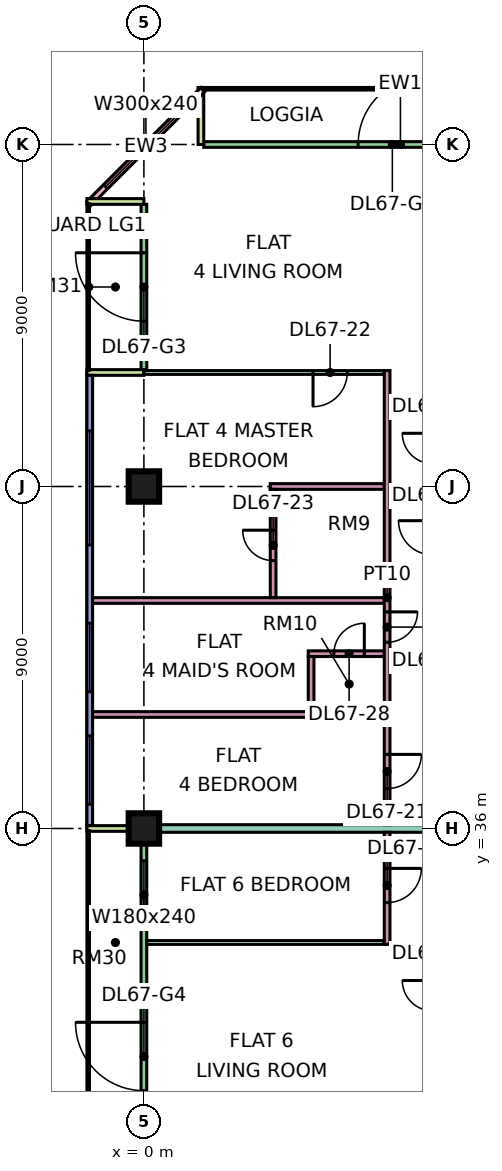
"""IFC4 building model, lengths in metres.
Left out: names, types, materials, properties, quantities, classifications, styles, units other than length and angle.
Written with IfcOpenShell. Run it as: python <this file> out.ifc"""

import sys

from ifc_helpers import new_model, si_unit, direction, frame, frame_2d, origin, origin_2d, place, context, subcontext, project, spatial, rectangle, extrude, element, fill, save


model = new_model("IFC4")
c1 = context("Model", 3, precision=1e-05, world=origin(), true_north=direction((0.0, 1.0)))
c2 = subcontext(c1, "Body", "Model", "MODEL_VIEW")
j1 = project(units=[si_unit("LENGTHUNIT", "METRE"), si_unit("PLANEANGLEUNIT", "RADIAN")], contexts=[c1])
p1 = place(None, origin())
s1 = spatial("IfcSite", under=j1, at=p1, CompositionType="ELEMENT")
p2 = place(p1, origin())
s2 = spatial("IfcBuilding", under=s1, at=p2, CompositionType="ELEMENT")
p3 = place(p2, frame((0.0, 0.0, 288.4)))
s3 = spatial("IfcBuildingStorey", under=s2, at=p3, CompositionType="ELEMENT", Elevation=288.4)
p4 = place(p3, frame((0.0, 36.0, 0.0), z_axis=(0.0, 0.0, 1.0), x_axis=(1.0, 0.0, 0.0)))
e1 = element("IfcColumn", 1, at=p4, inside=s3, PredefinedType="COLUMN", context=c2, shape_type="SweptSolid", body=[
    extrude(rectangle(XDim=0.8, YDim=0.8, at=origin_2d()), origin(), (0.0, 0.0, 1.0), 3.75),
])
p5 = place(p3, frame((0.0, 45.0, 0.0), z_axis=(0.0, 0.0, 1.0), x_axis=(1.0, 0.0, 0.0)))
e2 = element("IfcColumn", 2, at=p5, inside=s3, PredefinedType="COLUMN", context=c2, shape_type="SweptSolid", body=[
    extrude(rectangle(XDim=0.8, YDim=0.8, at=origin_2d()), origin(), (0.0, 0.0, 1.0), 3.75),
])
p6 = place(p3, frame((11.925, 54.0, 0.0), z_axis=(0.0, 0.0, 1.0), x_axis=(-1.0, 0.0, 0.0)))
e3 = element("IfcWall", 3, at=p6, inside=s3, PredefinedType="SOLIDWALL", context=c2, shape_type="SweptSolid", body=[
    extrude(rectangle(XDim=10.35, YDim=0.15, at=frame_2d((5.175, 0.0))), origin(), (0.0, 0.0, 1.0), 3.35),
])
p7 = place(p6, frame((4.488, 0.0, 0.0)))
e4 = element("IfcOpeningElement", 4, at=p7, cuts=e3, PredefinedType="OPENING", context=c2, shape_type="SweptSolid", body=[
    extrude(rectangle(XDim=1.8, YDim=2.4, at=frame_2d((0.9, 1.2))), frame((0.0, 0.085, 0.0), z_axis=(0.0, -1.0, 0.0), x_axis=(1.0, 0.0, 0.0)), (0.0, 0.0, 1.0), 0.17),
])
p8 = place(p3, frame((1.5, 55.5, 0.0), z_axis=(0.0, 0.0, 1.0), x_axis=(0.0, -1.0, 0.0)))
e5 = element("IfcWall", 5, at=p8, inside=s3, PredefinedType="SOLIDWALL", context=c2, shape_type="SweptSolid", body=[
    extrude(rectangle(XDim=1.5, YDim=0.15, at=frame_2d((0.75, 0.0))), origin(), (0.0, 0.0, 1.0), 3.35),
])
p9 = place(p3, frame((1.553, 55.447, 0.0), z_axis=(0.0, 0.0, 1.0), x_axis=(-0.707106781187, -0.707106781187, 0.0)))
e6 = element("IfcWall", 6, at=p9, inside=s3, PredefinedType="SOLIDWALL", context=c2, shape_type="SweptSolid", body=[
    extrude(rectangle(XDim=4.243, YDim=0.15, at=frame_2d((2.121, 0.0))), origin(), (0.0, 0.0, 1.0), 3.35),
])
p10 = place(p9, frame((0.621, 0.0, 0.45)))
e7 = element("IfcOpeningElement", 7, at=p10, cuts=e6, PredefinedType="OPENING", context=c2, shape_type="SweptSolid", body=[
    extrude(rectangle(XDim=3.0, YDim=2.4, at=frame_2d((1.5, 1.2))), frame((0.0, 0.085, 0.0), z_axis=(0.0, -1.0, 0.0), x_axis=(1.0, 0.0, 0.0)), (0.0, 0.0, 1.0), 0.17),
])
p11 = place(p3, frame((0.0, 52.425, 0.0), z_axis=(0.0, 0.0, 1.0), x_axis=(0.0, -1.0, 0.0)))
e8 = element("IfcWall", 8, at=p11, inside=s3, PredefinedType="SOLIDWALL", context=c2, shape_type="SweptSolid", body=[
    extrude(rectangle(XDim=4.35, YDim=0.15, at=frame_2d((2.175, 0.0))), origin(), (0.0, 0.0, 1.0), 3.35),
])
p12 = place(p11, frame((1.275, 0.0, 0.0)))
e9 = element("IfcOpeningElement", 9, at=p12, cuts=e8, PredefinedType="OPENING", context=c2, shape_type="SweptSolid", body=[
    extrude(rectangle(XDim=1.8, YDim=2.4, at=frame_2d((0.9, 1.2))), frame((0.0, 0.085, 0.0), z_axis=(0.0, -1.0, 0.0), x_axis=(1.0, 0.0, 0.0)), (0.0, 0.0, 1.0), 0.17),
])
for number, where, z_axis, x_axis in (
    (10, (-1.5, 52.5, 0.0), (0.0, 0.0, 1.0), (1.0, 0.0, 0.0)),
    (11, (-1.5, 48.0, 0.0), (0.0, 0.0, 1.0), (1.0, 0.0, 0.0)),
):
    element("IfcWall", number, at=place(p3, frame(where, z_axis=z_axis, x_axis=x_axis)), inside=s3, PredefinedType="SOLIDWALL", context=c2, shape_type="SweptSolid", body=[
        extrude(rectangle(XDim=1.5, YDim=0.15, at=frame_2d((0.75, 0.0))), origin(), (0.0, 0.0, 1.0), 3.35),
    ])
p13 = place(p3, frame((-1.425, 47.925, 0.0), z_axis=(0.0, 0.0, 1.0), x_axis=(0.0, -1.0, 0.0)))
e12 = element("IfcWall", 12, at=p13, inside=s3, PredefinedType="SOLIDWALL", context=c2, shape_type="SweptSolid", body=[
    extrude(rectangle(XDim=11.85, YDim=0.15, at=frame_2d((5.925, 0.0))), origin(), (0.0, 0.0, 1.0), 3.35),
])
p14 = place(p13, frame((1.462, 0.0, 0.45)))
e13 = element("IfcOpeningElement", 13, at=p14, cuts=e12, PredefinedType="OPENING", context=c2, shape_type="SweptSolid", body=[
    extrude(rectangle(XDim=3.0, YDim=2.4, at=frame_2d((1.5, 1.2))), frame((0.0, 0.085, 0.0), z_axis=(0.0, -1.0, 0.0), x_axis=(1.0, 0.0, 0.0)), (0.0, 0.0, 1.0), 0.17),
])
p15 = place(p13, frame((6.525, 0.0, 0.45)))
e14 = element("IfcOpeningElement", 14, at=p15, cuts=e12, PredefinedType="OPENING", context=c2, shape_type="SweptSolid", body=[
    extrude(rectangle(XDim=1.8, YDim=2.4, at=frame_2d((0.9, 1.2))), frame((0.0, 0.085, 0.0), z_axis=(0.0, -1.0, 0.0), x_axis=(1.0, 0.0, 0.0)), (0.0, 0.0, 1.0), 0.17),
])
p16 = place(p13, frame((9.488, 0.0, 0.45)))
e15 = element("IfcOpeningElement", 15, at=p16, cuts=e12, PredefinedType="OPENING", context=c2, shape_type="SweptSolid", body=[
    extrude(rectangle(XDim=1.8, YDim=2.4, at=frame_2d((0.9, 1.2))), frame((0.0, 0.085, 0.0), z_axis=(0.0, -1.0, 0.0), x_axis=(1.0, 0.0, 0.0)), (0.0, 0.0, 1.0), 0.17),
])
p17 = place(p3, frame((0.0, 35.925, 0.0), z_axis=(0.0, 0.0, 1.0), x_axis=(0.0, -1.0, 0.0)))
e16 = element("IfcWall", 16, at=p17, inside=s3, PredefinedType="SOLIDWALL", context=c2, shape_type="SweptSolid", body=[
    extrude(rectangle(XDim=11.85, YDim=0.15, at=frame_2d((5.925, 0.0))), origin(), (0.0, 0.0, 1.0), 3.35),
])
p18 = place(p17, frame((0.775, 0.0, 0.45)))
e17 = element("IfcOpeningElement", 17, at=p18, cuts=e16, PredefinedType="OPENING", context=c2, shape_type="SweptSolid", body=[
    extrude(rectangle(XDim=1.8, YDim=2.4, at=frame_2d((0.9, 1.2))), frame((0.0, 0.085, 0.0), z_axis=(0.0, -1.0, 0.0), x_axis=(1.0, 0.0, 0.0)), (0.0, 0.0, 1.0), 0.17),
])
p19 = place(p17, frame((5.025, 0.0, 0.0)))
e18 = element("IfcOpeningElement", 18, at=p19, cuts=e16, PredefinedType="OPENING", context=c2, shape_type="SweptSolid", body=[
    extrude(rectangle(XDim=1.8, YDim=2.4, at=frame_2d((0.9, 1.2))), frame((0.0, 0.085, 0.0), z_axis=(0.0, -1.0, 0.0), x_axis=(1.0, 0.0, 0.0)), (0.0, 0.0, 1.0), 0.17),
])
p20 = place(p17, frame((9.275, 0.0, 0.45)))
e19 = element("IfcOpeningElement", 19, at=p20, cuts=e16, PredefinedType="OPENING", context=c2, shape_type="SweptSolid", body=[
    extrude(rectangle(XDim=1.8, YDim=2.4, at=frame_2d((0.9, 1.2))), frame((0.0, 0.085, 0.0), z_axis=(0.0, -1.0, 0.0), x_axis=(1.0, 0.0, 0.0)), (0.0, 0.0, 1.0), 0.17),
])
p21 = place(p3, frame((-1.5, 36.0, 0.0), z_axis=(0.0, 0.0, 1.0), x_axis=(1.0, 0.0, 0.0)))
e20 = element("IfcWall", 20, at=p21, inside=s3, PredefinedType="SOLIDWALL", context=c2, shape_type="SweptSolid", body=[
    extrude(rectangle(XDim=1.5, YDim=0.15, at=frame_2d((0.75, 0.0))), origin(), (0.0, 0.0, 1.0), 3.35),
])
for number, where, z_axis, x_axis in (
    (21, (-1.351, 39.0, 0.0), (0.0, 0.0, 1.0), (1.0, 0.0, 0.0)),
    (22, (-1.351, 42.0, 0.0), (0.0, 0.0, 1.0), (1.0, 0.0, 0.0)),
):
    element("IfcWall", number, at=place(p3, frame(where, z_axis=z_axis, x_axis=x_axis)), inside=s3, PredefinedType="PARTITIONING", context=c2, shape_type="SweptSolid", body=[
        extrude(rectangle(XDim=7.676, YDim=0.15, at=frame_2d((3.838, 0.0))), origin(), (0.0, 0.0, 1.0), 3.35),
    ])
e23 = element("IfcWall", 23, at=p4, inside=s3, PredefinedType="PARTITIONING", context=c2, shape_type="SweptSolid", body=[
    extrude(rectangle(XDim=12.3, YDim=0.2, at=frame_2d((6.15, 0.0))), origin(), (0.0, 0.0, 1.0), 3.35),
])
p22 = place(p3, frame((0.0, 48.0, 0.0), z_axis=(0.0, 0.0, 1.0), x_axis=(1.0, 0.0, 0.0)))
e24 = element("IfcWall", 24, at=p22, inside=s3, PredefinedType="PARTITIONING", context=c2, shape_type="SweptSolid", body=[
    extrude(rectangle(XDim=6.325, YDim=0.1, at=frame_2d((3.163, 0.0))), origin(), (0.0, 0.0, 1.0), 3.35),
])
p23 = place(p22, frame((4.45, 0.0, 0.0)))
e25 = element("IfcOpeningElement", 25, at=p23, cuts=e24, PredefinedType="OPENING", context=c2, shape_type="SweptSolid", body=[
    extrude(rectangle(XDim=0.9, YDim=2.1, at=frame_2d((0.45, 1.05))), frame((0.0, 0.06, 0.0), z_axis=(0.0, -1.0, 0.0), x_axis=(1.0, 0.0, 0.0)), (0.0, 0.0, 1.0), 0.12),
])
p24 = place(p3, frame((0.074, 33.0, 0.0), z_axis=(0.0, 0.0, 1.0), x_axis=(1.0, 0.0, 0.0)))
e26 = element("IfcWall", 26, at=p24, inside=s3, PredefinedType="PARTITIONING", context=c2, shape_type="SweptSolid", body=[
    extrude(rectangle(XDim=6.251, YDim=0.1, at=frame_2d((3.125, 0.0))), origin(), (0.0, 0.0, 1.0), 3.35),
])
p25 = place(p3, frame((3.325, 45.0, 0.0), z_axis=(0.0, 0.0, 1.0), x_axis=(1.0, 0.0, 0.0)))
e27 = element("IfcWall", 27, at=p25, inside=s3, PredefinedType="PARTITIONING", context=c2, shape_type="SweptSolid", body=[
    extrude(rectangle(XDim=3.0, YDim=0.15, at=frame_2d((1.5, 0.0))), origin(), (0.0, 0.0, 1.0), 3.35),
])
p26 = place(p3, frame((3.4, 42.075, 0.0), z_axis=(0.0, 0.0, 1.0), x_axis=(0.0, 1.0, 0.0)))
e28 = element("IfcWall", 28, at=p26, inside=s3, PredefinedType="PARTITIONING", context=c2, shape_type="SweptSolid", body=[
    extrude(rectangle(XDim=2.85, YDim=0.15, at=frame_2d((1.425, 0.0))), origin(), (0.0, 0.0, 1.0), 3.35),
])
p27 = place(p26, frame((0.975, 0.0, 0.0)))
e29 = element("IfcOpeningElement", 29, at=p27, cuts=e28, PredefinedType="OPENING", context=c2, shape_type="SweptSolid", body=[
    extrude(rectangle(XDim=0.8, YDim=2.1, at=frame_2d((0.4, 1.05))), frame((0.0, 0.085, 0.0), z_axis=(0.0, -1.0, 0.0), x_axis=(1.0, 0.0, 0.0)), (0.0, 0.0, 1.0), 0.17),
])
p28 = place(p3, frame((4.325, 40.6, 0.0), z_axis=(0.0, 0.0, 1.0), x_axis=(1.0, 0.0, 0.0)))
e30 = element("IfcWall", 30, at=p28, inside=s3, PredefinedType="PARTITIONING", context=c2, shape_type="SweptSolid", body=[
    extrude(rectangle(XDim=2.0, YDim=0.15, at=frame_2d((1.0, 0.0))), origin(), (0.0, 0.0, 1.0), 3.35),
])
p29 = place(p28, frame((0.675, 0.0, 0.0)))
e31 = element("IfcOpeningElement", 31, at=p29, cuts=e30, PredefinedType="OPENING", context=c2, shape_type="SweptSolid", body=[
    extrude(rectangle(XDim=0.8, YDim=2.1, at=frame_2d((0.4, 1.05))), frame((0.0, 0.085, 0.0), z_axis=(0.0, -1.0, 0.0), x_axis=(1.0, 0.0, 0.0)), (0.0, 0.0, 1.0), 0.17),
])
p30 = place(p3, frame((4.4, 39.075, 0.0), z_axis=(0.0, 0.0, 1.0), x_axis=(0.0, 1.0, 0.0)))
e32 = element("IfcWall", 32, at=p30, inside=s3, PredefinedType="PARTITIONING", context=c2, shape_type="SweptSolid", body=[
    extrude(rectangle(XDim=1.45, YDim=0.15, at=frame_2d((0.725, 0.0))), origin(), (0.0, 0.0, 1.0), 3.35),
])
p31 = place(p3, frame((6.4, 32.95, 0.0), z_axis=(0.0, 0.0, 1.0), x_axis=(0.0, 1.0, 0.0)))
e33 = element("IfcWall", 33, at=p31, inside=s3, PredefinedType="PARTITIONING", context=c2, shape_type="SweptSolid", body=[
    extrude(rectangle(XDim=2.95, YDim=0.15, at=frame_2d((1.475, 0.0))), origin(), (0.0, 0.0, 1.0), 3.35),
])
p32 = place(p31, frame((1.1, 0.0, 0.0)))
e34 = element("IfcOpeningElement", 34, at=p32, cuts=e33, PredefinedType="OPENING", context=c2, shape_type="SweptSolid", body=[
    extrude(rectangle(XDim=0.9, YDim=2.1, at=frame_2d((0.45, 1.05))), frame((0.0, 0.085, 0.0), z_axis=(0.0, -1.0, 0.0), x_axis=(1.0, 0.0, 0.0)), (0.0, 0.0, 1.0), 0.17),
])
p33 = place(p3, frame((6.4, 36.1, 0.0), z_axis=(0.0, 0.0, 1.0), x_axis=(0.0, 1.0, 0.0)))
e35 = element("IfcWall", 35, at=p33, inside=s3, PredefinedType="PARTITIONING", context=c2, shape_type="SweptSolid", body=[
    extrude(rectangle(XDim=11.95, YDim=0.15, at=frame_2d((5.975, 0.0))), origin(), (0.0, 0.0, 1.0), 3.35),
])
p34 = place(p33, frame((0.95, 0.0, 0.0)))
e36 = element("IfcOpeningElement", 36, at=p34, cuts=e35, PredefinedType="OPENING", context=c2, shape_type="SweptSolid", body=[
    extrude(rectangle(XDim=0.9, YDim=2.1, at=frame_2d((0.45, 1.05))), frame((0.0, 0.085, 0.0), z_axis=(0.0, -1.0, 0.0), x_axis=(1.0, 0.0, 0.0)), (0.0, 0.0, 1.0), 0.17),
])
p35 = place(p33, frame((4.8, 0.0, 0.0)))
e37 = element("IfcOpeningElement", 37, at=p35, cuts=e35, PredefinedType="OPENING", context=c2, shape_type="SweptSolid", body=[
    extrude(rectangle(XDim=0.8, YDim=2.1, at=frame_2d((0.4, 1.05))), frame((0.0, 0.085, 0.0), z_axis=(0.0, -1.0, 0.0), x_axis=(1.0, 0.0, 0.0)), (0.0, 0.0, 1.0), 0.17),
])
p36 = place(p7, frame((1.8, 0.0, 0.0), z_axis=(0.0, 0.0, 1.0), x_axis=(-1.0, 0.0, 0.0)))
e38 = element("IfcDoor", 38, at=p36, inside=s3, OperationType="DOUBLE_DOOR_SINGLE_SWING", PredefinedType="DOOR", context=c2, shape_type="SweptSolid", body=[
    extrude(rectangle(XDim=1.8, YDim=2.4, at=frame_2d((0.9, 1.2))), frame((0.0, 0.025, 0.0), z_axis=(0.0, -1.0, 0.0), x_axis=(1.0, 0.0, 0.0)), (0.0, 0.0, 1.0), 0.05),
])
fill(e4, e38)
p37 = place(p10, origin())
e39 = element("IfcWindow", 39, at=p37, inside=s3, PartitioningType="SINGLE_PANEL", PredefinedType="WINDOW", context=c2, shape_type="SweptSolid", body=[
    extrude(rectangle(XDim=3.0, YDim=2.4, at=frame_2d((1.5, 1.2))), frame((0.0, 0.03, 0.0), z_axis=(0.0, -1.0, 0.0), x_axis=(1.0, 0.0, 0.0)), (0.0, 0.0, 1.0), 0.06),
])
fill(e7, e39)
p38 = place(p12, frame((1.8, 0.0, 0.0), z_axis=(0.0, 0.0, 1.0), x_axis=(-1.0, 0.0, 0.0)))
e40 = element("IfcDoor", 40, at=p38, inside=s3, OperationType="DOUBLE_DOOR_SINGLE_SWING", PredefinedType="DOOR", context=c2, shape_type="SweptSolid", body=[
    extrude(rectangle(XDim=1.8, YDim=2.4, at=frame_2d((0.9, 1.2))), frame((0.0, 0.025, 0.0), z_axis=(0.0, -1.0, 0.0), x_axis=(1.0, 0.0, 0.0)), (0.0, 0.0, 1.0), 0.05),
])
fill(e9, e40)
p39 = place(p14, origin())
e41 = element("IfcWindow", 41, at=p39, inside=s3, PartitioningType="SINGLE_PANEL", PredefinedType="WINDOW", context=c2, shape_type="SweptSolid", body=[
    extrude(rectangle(XDim=3.0, YDim=2.4, at=frame_2d((1.5, 1.2))), frame((0.0, 0.03, 0.0), z_axis=(0.0, -1.0, 0.0), x_axis=(1.0, 0.0, 0.0)), (0.0, 0.0, 1.0), 0.06),
])
fill(e13, e41)
p40 = place(p15, origin())
e42 = element("IfcWindow", 42, at=p40, inside=s3, PartitioningType="SINGLE_PANEL", PredefinedType="WINDOW", context=c2, shape_type="SweptSolid", body=[
    extrude(rectangle(XDim=1.8, YDim=2.4, at=frame_2d((0.9, 1.2))), frame((0.0, 0.03, 0.0), z_axis=(0.0, -1.0, 0.0), x_axis=(1.0, 0.0, 0.0)), (0.0, 0.0, 1.0), 0.06),
])
fill(e14, e42)
p41 = place(p16, origin())
e43 = element("IfcWindow", 43, at=p41, inside=s3, PartitioningType="SINGLE_PANEL", PredefinedType="WINDOW", context=c2, shape_type="SweptSolid", body=[
    extrude(rectangle(XDim=1.8, YDim=2.4, at=frame_2d((0.9, 1.2))), frame((0.0, 0.03, 0.0), z_axis=(0.0, -1.0, 0.0), x_axis=(1.0, 0.0, 0.0)), (0.0, 0.0, 1.0), 0.06),
])
fill(e15, e43)
p42 = place(p18, origin())
e44 = element("IfcWindow", 44, at=p42, inside=s3, PartitioningType="SINGLE_PANEL", PredefinedType="WINDOW", context=c2, shape_type="SweptSolid", body=[
    extrude(rectangle(XDim=1.8, YDim=2.4, at=frame_2d((0.9, 1.2))), frame((0.0, 0.03, 0.0), z_axis=(0.0, -1.0, 0.0), x_axis=(1.0, 0.0, 0.0)), (0.0, 0.0, 1.0), 0.06),
])
fill(e17, e44)
p43 = place(p19, frame((1.8, 0.0, 0.0), z_axis=(0.0, 0.0, 1.0), x_axis=(-1.0, 0.0, 0.0)))
e45 = element("IfcDoor", 45, at=p43, inside=s3, OperationType="DOUBLE_DOOR_SINGLE_SWING", PredefinedType="DOOR", context=c2, shape_type="SweptSolid", body=[
    extrude(rectangle(XDim=1.8, YDim=2.4, at=frame_2d((0.9, 1.2))), frame((0.0, 0.025, 0.0), z_axis=(0.0, -1.0, 0.0), x_axis=(1.0, 0.0, 0.0)), (0.0, 0.0, 1.0), 0.05),
])
fill(e18, e45)
p44 = place(p34, origin())
e46 = element("IfcDoor", 46, at=p44, inside=s3, OperationType="SINGLE_SWING_RIGHT", PredefinedType="DOOR", context=c2, shape_type="SweptSolid", body=[
    extrude(rectangle(XDim=0.9, YDim=2.1, at=frame_2d((0.45, 1.05))), frame((0.0, 0.025, 0.0), z_axis=(0.0, -1.0, 0.0), x_axis=(1.0, 0.0, 0.0)), (0.0, 0.0, 1.0), 0.05),
])
fill(e36, e46)
p45 = place(p23, frame((0.9, 0.0, 0.0), z_axis=(0.0, 0.0, 1.0), x_axis=(-1.0, 0.0, 0.0)))
e47 = element("IfcDoor", 47, at=p45, inside=s3, OperationType="SINGLE_SWING_LEFT", PredefinedType="DOOR", context=c2, shape_type="SweptSolid", body=[
    extrude(rectangle(XDim=0.9, YDim=2.1, at=frame_2d((0.45, 1.05))), frame((0.0, 0.025, 0.0), z_axis=(0.0, -1.0, 0.0), x_axis=(1.0, 0.0, 0.0)), (0.0, 0.0, 1.0), 0.05),
])
fill(e25, e47)
p46 = place(p27, frame((0.8, 0.0, 0.0), z_axis=(0.0, 0.0, 1.0), x_axis=(-1.0, 0.0, 0.0)))
e48 = element("IfcDoor", 48, at=p46, inside=s3, OperationType="SINGLE_SWING_RIGHT", PredefinedType="DOOR", context=c2, shape_type="SweptSolid", body=[
    extrude(rectangle(XDim=0.8, YDim=2.1, at=frame_2d((0.4, 1.05))), frame((0.0, 0.025, 0.0), z_axis=(0.0, -1.0, 0.0), x_axis=(1.0, 0.0, 0.0)), (0.0, 0.0, 1.0), 0.05),
])
fill(e29, e48)
p47 = place(p35, origin())
e49 = element("IfcDoor", 49, at=p47, inside=s3, OperationType="SINGLE_SWING_RIGHT", PredefinedType="DOOR", context=c2, shape_type="SweptSolid", body=[
    extrude(rectangle(XDim=0.8, YDim=2.1, at=frame_2d((0.4, 1.05))), frame((0.0, 0.025, 0.0), z_axis=(0.0, -1.0, 0.0), x_axis=(1.0, 0.0, 0.0)), (0.0, 0.0, 1.0), 0.05),
])
fill(e37, e49)
p48 = place(p29, frame((0.8, 0.0, 0.0), z_axis=(0.0, 0.0, 1.0), x_axis=(-1.0, 0.0, 0.0)))
e50 = element("IfcDoor", 50, at=p48, inside=s3, OperationType="SINGLE_SWING_RIGHT", PredefinedType="DOOR", context=c2, shape_type="SweptSolid", body=[
    extrude(rectangle(XDim=0.8, YDim=2.1, at=frame_2d((0.4, 1.05))), frame((0.0, 0.025, 0.0), z_axis=(0.0, -1.0, 0.0), x_axis=(1.0, 0.0, 0.0)), (0.0, 0.0, 1.0), 0.05),
])
fill(e31, e50)
p49 = place(p32, origin())
e51 = element("IfcDoor", 51, at=p49, inside=s3, OperationType="SINGLE_SWING_RIGHT", PredefinedType="DOOR", context=c2, shape_type="SweptSolid", body=[
    extrude(rectangle(XDim=0.9, YDim=2.1, at=frame_2d((0.45, 1.05))), frame((0.0, 0.025, 0.0), z_axis=(0.0, -1.0, 0.0), x_axis=(1.0, 0.0, 0.0)), (0.0, 0.0, 1.0), 0.05),
])
fill(e34, e51)
save(model, sys.argv[1])
